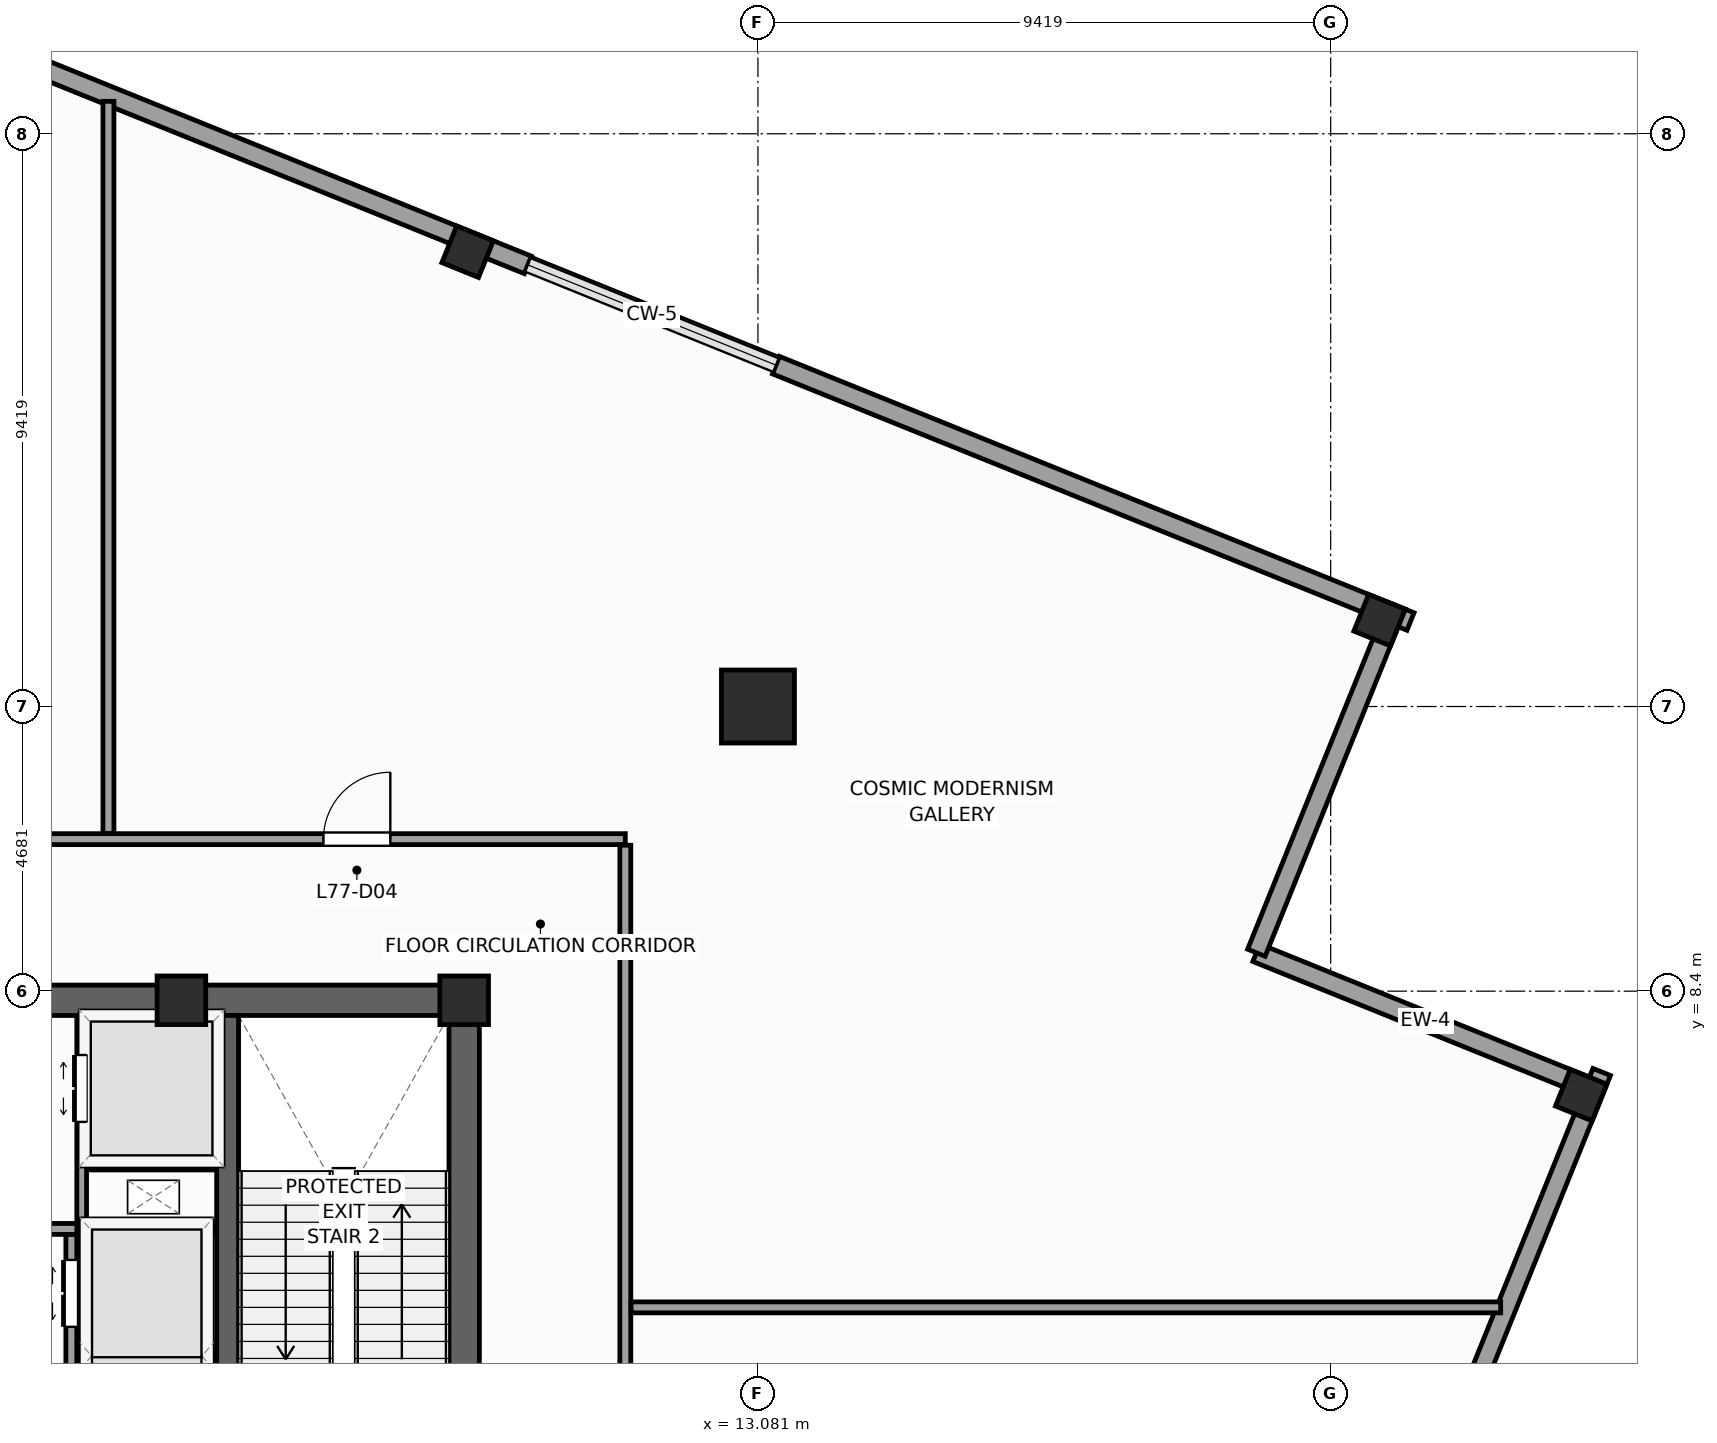
"""IFC4 building model, lengths in metres.
Left out: names, types, materials, properties, quantities, classifications, styles, units other than length and angle.
Written with IfcOpenShell. Run it as: python <this file> out.ifc"""

import sys

from ifc_helpers import new_model, si_unit, direction, frame, frame_2d, origin, origin_2d, place, context, subcontext, project, spatial, rectangle, extrude, source, transform, mapped, element, fill, save


model = new_model("IFC4")
c1 = context("Model", 3, precision=1e-05, world=origin(), true_north=direction((0.0, 1.0)))
c2 = subcontext(c1, "Body", "Model", "MODEL_VIEW")
j1 = project(units=[si_unit("LENGTHUNIT", "METRE"), si_unit("PLANEANGLEUNIT", "RADIAN")], contexts=[c1])
p1 = place(None, origin())
s1 = spatial("IfcSite", under=j1, at=p1, CompositionType="ELEMENT")
p2 = place(p1, origin())
s2 = spatial("IfcBuilding", under=s1, at=p2, CompositionType="ELEMENT")
p3 = place(p2, frame((0.0, 0.0, 312.0)))
s3 = spatial("IfcBuildingStorey", under=s2, at=p3, CompositionType="ELEMENT", Elevation=312.0)
p4 = place(p3, frame((-8.5, 8.25, 0.0), z_axis=(0.0, 0.0, 1.0), x_axis=(1.0, 0.0, 0.0)))
e1 = element("IfcWall", 1, at=p4, inside=s3, PredefinedType="SHEAR", context=c2, shape_type="SweptSolid", body=[
    extrude(rectangle(XDim=17.0, YDim=0.5, at=frame_2d((8.5, 0.0))), origin(), (0.0, 0.0, 1.0), 4.8),
])
p5 = place(p4, frame((7.85, 0.0, 0.0)))
e2 = element("IfcOpeningElement", 2, at=p5, cuts=e1, PredefinedType="OPENING", context=c2, shape_type="SweptSolid", body=[
    extrude(rectangle(XDim=1.3, YDim=2.2, at=frame_2d((0.65, 1.1))), frame((0.0, 0.26, 0.0), z_axis=(0.0, -1.0, 0.0), x_axis=(1.0, 0.0, 0.0)), (0.0, 0.0, 1.0), 0.52),
])
p6 = place(p3, frame((8.25, -8.0, 0.0), z_axis=(0.0, 0.0, 1.0), x_axis=(0.0, 1.0, 0.0)))
e3 = element("IfcWall", 3, at=p6, inside=s3, PredefinedType="SHEAR", context=c2, shape_type="SweptSolid", body=[
    extrude(rectangle(XDim=16.0, YDim=0.5, at=frame_2d((8.0, 0.0))), origin(), (0.0, 0.0, 1.0), 4.8),
])
p7 = place(p6, frame((4.69, 0.0, 0.0)))
e4 = element("IfcOpeningElement", 4, at=p7, cuts=e3, PredefinedType="OPENING", context=c2, shape_type="SweptSolid", body=[
    extrude(rectangle(XDim=1.3, YDim=2.2, at=frame_2d((0.65, 1.1))), frame((0.0, 0.26, 0.0), z_axis=(0.0, -1.0, 0.0), x_axis=(1.0, 0.0, 0.0)), (0.0, 0.0, 1.0), 0.52),
])
p8 = place(p3, frame((4.36, -8.0, 0.0), z_axis=(0.0, 0.0, 1.0), x_axis=(0.0, 1.0, 0.0)))
e5 = element("IfcWall", 5, at=p8, inside=s3, PredefinedType="SHEAR", context=c2, shape_type="SweptSolid", body=[
    extrude(rectangle(XDim=16.0, YDim=0.36, at=frame_2d((8.0, 0.0))), origin(), (0.0, 0.0, 1.0), 4.8),
])
m1 = source(origin(), c2, "Body", "SweptSolid", [
    extrude(rectangle(XDim=0.8, YDim=0.8, at=origin_2d()), origin(), (0.0, 0.0, 1.0), 4.8),
])
for number, where, z_axis, x_axis in (
    (6, (8.25, 8.25, 0.0), (0.0, 0.0, 1.0), (1.0, 0.0, 0.0)),
    (7, (3.6, 8.25, 0.0), (0.0, 0.0, 1.0), (1.0, 0.0, 0.0)),
):
    element("IfcColumn", number, at=place(p3, frame(where, z_axis=z_axis, x_axis=x_axis)), inside=s3, PredefinedType="PILASTER", context=c2, shape_type="MappedRepresentation", body=[
        mapped(m1, transform((0.0, 0.0, 0.0), scale=1.0)),
    ])
m2 = source(origin(), c2, "Body", "SweptSolid", [
    extrude(rectangle(XDim=1.2, YDim=1.2, at=origin_2d()), origin(), (0.0, 0.0, 1.0), 4.8),
])
p9 = place(p3, frame((13.081, 13.081, 0.0), z_axis=(0.0, 0.0, 1.0), x_axis=(1.0, 0.0, 0.0)))
e8 = element("IfcColumn", 8, at=p9, inside=s3, PredefinedType="COLUMN", context=c2, shape_type="MappedRepresentation", body=[
    mapped(m2, transform((0.0, 0.0, 0.0), scale=1.0)),
])
m3 = source(origin(), c2, "Body", "SweptSolid", [
    extrude(rectangle(XDim=0.65, YDim=0.65, at=origin_2d()), origin(), (0.0, 0.0, 1.0), 4.8),
])
for number, where, z_axis, x_axis in (
    (9, (26.62, 6.69, 0.0), (0.0, 0.0, 1.0), (0.375, 0.927, 0.0)),
    (10, (23.304, 14.501, 0.0), (0.0, 0.0, 1.0), (0.375, 0.927, 0.0)),
    (11, (8.307, 20.56, 0.0), (0.0, 0.0, 1.0), (0.375, 0.927, 0.0)),
):
    element("IfcColumn", number, at=place(p3, frame(where, z_axis=z_axis, x_axis=x_axis)), inside=s3, PredefinedType="COLUMN", context=c2, shape_type="MappedRepresentation", body=[
        mapped(m3, transform((0.0, 0.0, 0.0), scale=1.0)),
    ])
p10 = place(p3, frame((26.841, 6.784, 0.0), z_axis=(0.0, 0.0, 1.0), x_axis=(-0.927171722085, 0.374636620962, 0.0)))
e12 = element("IfcWall", 12, at=p10, inside=s3, PredefinedType="STANDARD", context=c2, shape_type="SweptSolid", body=[
    extrude(rectangle(XDim=6.0, YDim=0.31, at=frame_2d((3.0, 0.0))), origin(), (0.0, 0.0, 1.0), 3.85),
])
p11 = place(p3, frame((21.278, 9.032, 0.0), z_axis=(0.0, 0.0, 1.0), x_axis=(0.374602739196, 0.927185411764, 0.0)))
e13 = element("IfcWall", 13, at=p11, inside=s3, PredefinedType="STANDARD", context=c2, shape_type="SweptSolid", body=[
    extrude(rectangle(XDim=6.155, YDim=0.31, at=frame_2d((3.078, 0.0))), origin(), (0.0, 0.0, 1.0), 4.55),
])
p12 = place(p3, frame((20.718, -8.371, 0.0), z_axis=(0.0, 0.0, 1.0), x_axis=(0.374600710538, 0.927186231382, 0.0)))
e14 = element("IfcWall", 14, at=p12, inside=s3, PredefinedType="STANDARD", context=c2, shape_type="SweptSolid", body=[
    extrude(rectangle(XDim=16.655, YDim=0.31, at=frame_2d((8.328, 0.0))), origin(), (0.0, 0.0, 1.0), 3.95),
])
p13 = place(p12, frame((6.195, 0.0, 0.65)))
e15 = element("IfcOpeningElement", 15, at=p13, cuts=e14, PredefinedType="OPENING", context=c2, shape_type="SweptSolid", body=[
    extrude(rectangle(XDim=2.6, YDim=3.0, at=frame_2d((1.3, 1.5))), frame((0.0, 0.165, 0.0), z_axis=(0.0, -1.0, 0.0), x_axis=(1.0, 0.0, 0.0)), (0.0, 0.0, 1.0), 0.33),
])
p14 = place(p3, frame((23.813, 14.479, 0.0), z_axis=(0.0, 0.0, 1.0), x_axis=(-0.927178527544, 0.374619777991, 0.0)))
e16 = element("IfcWall", 16, at=p14, inside=s3, PredefinedType="STANDARD", context=c2, shape_type="SweptSolid", body=[
    extrude(rectangle(XDim=11.255, YDim=0.31, at=frame_2d((5.627, 0.0))), origin(), (0.0, 0.0, 1.0), 3.95),
])
p15 = place(p3, frame((9.298, 20.343, 0.0), z_axis=(0.0, 0.0, 1.0), x_axis=(-0.927183654967, 0.374607087443, 0.0)))
e17 = element("IfcWall", 17, at=p15, inside=s3, PredefinedType="STANDARD", context=c2, shape_type="SweptSolid", body=[
    extrude(rectangle(XDim=17.655, YDim=0.31, at=frame_2d((8.828, 0.0))), origin(), (0.0, 0.0, 1.0), 3.95),
])
p16 = place(p15, frame((9.646, 0.0, 0.65)))
e18 = element("IfcOpeningElement", 18, at=p16, cuts=e17, PredefinedType="OPENING", context=c2, shape_type="SweptSolid", body=[
    extrude(rectangle(XDim=2.6, YDim=3.0, at=frame_2d((1.3, 1.5))), frame((0.0, 0.165, 0.0), z_axis=(0.0, -1.0, 0.0), x_axis=(1.0, 0.0, 0.0)), (0.0, 0.0, 1.0), 0.33),
])
p17 = place(p3, frame((1.79, -7.98, 0.0), z_axis=(0.0, 0.0, 1.0), x_axis=(0.0, 1.0, 0.0)))
e19 = element("IfcWall", 19, at=p17, inside=s3, PredefinedType="PARTITIONING", context=c2, shape_type="SweptSolid", body=[
    extrude(rectangle(XDim=12.38, YDim=0.18, at=frame_2d((6.19, 0.0))), origin(), (0.0, 0.0, 1.0), 4.55),
])
p18 = place(p17, frame((8.8, 0.0, 0.0)))
e20 = element("IfcOpeningElement", 20, at=p18, cuts=e19, PredefinedType="OPENING", context=c2, shape_type="SweptSolid", body=[
    extrude(rectangle(XDim=1.1, YDim=2.2, at=frame_2d((0.55, 1.1))), frame((0.0, 0.1, 0.0), z_axis=(0.0, -1.0, 0.0), x_axis=(1.0, 0.0, 0.0)), (0.0, 0.0, 1.0), 0.2),
])
p19 = place(p17, frame((10.86, 0.0, 0.0)))
e21 = element("IfcOpeningElement", 21, at=p19, cuts=e19, PredefinedType="OPENING", context=c2, shape_type="SweptSolid", body=[
    extrude(rectangle(XDim=1.1, YDim=2.2, at=frame_2d((0.55, 1.1))), frame((0.0, 0.1, 0.0), z_axis=(0.0, -1.0, 0.0), x_axis=(1.0, 0.0, 0.0)), (0.0, 0.0, 1.0), 0.2),
])
p20 = place(p17, frame((1.4, 0.0, 0.0)))
e22 = element("IfcOpeningElement", 22, at=p20, cuts=e19, PredefinedType="OPENING", context=c2, shape_type="SweptSolid", body=[
    extrude(rectangle(XDim=1.15, YDim=2.25, at=frame_2d((0.575, 1.125))), frame((0.0, 0.1, 0.0), z_axis=(0.0, -1.0, 0.0), x_axis=(1.0, 0.0, 0.0)), (0.0, 0.0, 1.0), 0.2),
])
p21 = place(p17, frame((5.6, 0.0, 0.0)))
e23 = element("IfcOpeningElement", 23, at=p21, cuts=e19, PredefinedType="OPENING", context=c2, shape_type="SweptSolid", body=[
    extrude(rectangle(XDim=1.15, YDim=2.25, at=frame_2d((0.575, 1.125))), frame((0.0, 0.1, 0.0), z_axis=(0.0, -1.0, 0.0), x_axis=(1.0, 0.0, 0.0)), (0.0, 0.0, 1.0), 0.2),
])
p22 = place(p3, frame((-1.88, 4.49, 0.0), z_axis=(0.0, 0.0, 1.0), x_axis=(1.0, 0.0, 0.0)))
e24 = element("IfcWall", 24, at=p22, inside=s3, PredefinedType="PARTITIONING", context=c2, shape_type="SweptSolid", body=[
    extrude(rectangle(XDim=3.76, YDim=0.18, at=frame_2d((1.88, 0.0))), origin(), (0.0, 0.0, 1.0), 4.55),
])
p23 = place(p22, frame((1.23, 0.0, 0.0)))
e25 = element("IfcOpeningElement", 25, at=p23, cuts=e24, PredefinedType="OPENING", context=c2, shape_type="SweptSolid", body=[
    extrude(rectangle(XDim=1.3, YDim=2.2, at=frame_2d((0.65, 1.1))), frame((0.0, 0.1, 0.0), z_axis=(0.0, -1.0, 0.0), x_axis=(1.0, 0.0, 0.0)), (0.0, 0.0, 1.0), 0.2),
])
p24 = place(p3, frame((1.89, 4.49, 0.0), z_axis=(0.0, 0.0, 1.0), x_axis=(1.0, 0.0, 0.0)))
e26 = element("IfcWall", 26, at=p24, inside=s3, PredefinedType="PARTITIONING", context=c2, shape_type="SweptSolid", body=[
    extrude(rectangle(XDim=2.28, YDim=0.18, at=frame_2d((1.14, 0.0))), origin(), (0.0, 0.0, 1.0), 4.55),
])
p25 = place(p3, frame((1.9, 2.4, 0.0), z_axis=(0.0, 0.0, 1.0), x_axis=(1.0, 0.0, 0.0)))
e27 = element("IfcWall", 27, at=p25, inside=s3, PredefinedType="PARTITIONING", context=c2, shape_type="SweptSolid", body=[
    extrude(rectangle(XDim=2.26, YDim=0.12, at=frame_2d((1.13, 0.0))), origin(), (0.0, 0.0, 1.0), 4.55),
])
p26 = place(p3, frame((1.96, 4.58, 0.0), z_axis=(0.0, 0.0, 1.0), x_axis=(0.0, 1.0, 0.0)))
e28 = element("IfcWall", 28, at=p26, inside=s3, PredefinedType="PARTITIONING", context=c2, shape_type="SweptSolid", body=[
    extrude(rectangle(XDim=3.4, YDim=0.16, at=frame_2d((1.7, 0.0))), origin(), (0.0, 0.0, 1.0), 4.55),
])
p27 = place(p26, frame((1.67, 0.0, 0.0)))
e29 = element("IfcOpeningElement", 29, at=p27, cuts=e28, PredefinedType="OPENING", context=c2, shape_type="SweptSolid", body=[
    extrude(rectangle(XDim=1.1, YDim=2.2, at=frame_2d((0.55, 1.1))), frame((0.0, 0.09, 0.0), z_axis=(0.0, -1.0, 0.0), x_axis=(1.0, 0.0, 0.0)), (0.0, 0.0, 1.0), 0.18),
])
p28 = place(p3, frame((2.06, 5.52, 0.0), z_axis=(0.0, 0.0, 1.0), x_axis=(1.0, 0.0, 0.0)))
e30 = element("IfcWall", 30, at=p28, inside=s3, PredefinedType="PARTITIONING", context=c2, shape_type="SweptSolid", body=[
    extrude(rectangle(XDim=2.1, YDim=0.12, at=frame_2d((1.05, 0.0))), origin(), (0.0, 0.0, 1.0), 4.55),
])
p29 = place(p3, frame((-10.3, 10.9, 0.0), z_axis=(0.0, 0.0, 1.0), x_axis=(1.0, 0.0, 0.0)))
e31 = element("IfcWall", 31, at=p29, inside=s3, PredefinedType="PARTITIONING", context=c2, shape_type="SweptSolid", body=[
    extrude(rectangle(XDim=21.2, YDim=0.18, at=frame_2d((10.6, 0.0))), origin(), (0.0, 0.0, 1.0), 4.55),
])
p30 = place(p29, frame((1.605, 0.0, 0.0)))
e32 = element("IfcOpeningElement", 32, at=p30, cuts=e31, PredefinedType="OPENING", context=c2, shape_type="SweptSolid", body=[
    extrude(rectangle(XDim=0.95, YDim=2.1, at=frame_2d((0.475, 1.05))), frame((0.0, 0.1, 0.0), z_axis=(0.0, -1.0, 0.0), x_axis=(1.0, 0.0, 0.0)), (0.0, 0.0, 1.0), 0.2),
])
p31 = place(p29, frame((7.409, 0.0, 0.0)))
e33 = element("IfcOpeningElement", 33, at=p31, cuts=e31, PredefinedType="OPENING", context=c2, shape_type="SweptSolid", body=[
    extrude(rectangle(XDim=1.1, YDim=2.2, at=frame_2d((0.55, 1.1))), frame((0.0, 0.1, 0.0), z_axis=(0.0, -1.0, 0.0), x_axis=(1.0, 0.0, 0.0)), (0.0, 0.0, 1.0), 0.2),
])
p32 = place(p29, frame((16.236, 0.0, 0.0)))
e34 = element("IfcOpeningElement", 34, at=p32, cuts=e31, PredefinedType="OPENING", context=c2, shape_type="SweptSolid", body=[
    extrude(rectangle(XDim=1.1, YDim=2.2, at=frame_2d((0.55, 1.1))), frame((0.0, 0.1, 0.0), z_axis=(0.0, -1.0, 0.0), x_axis=(1.0, 0.0, 0.0)), (0.0, 0.0, 1.0), 0.2),
])
p33 = place(p3, frame((10.9, -10.2, 0.0), z_axis=(0.0, 0.0, 1.0), x_axis=(0.0, 1.0, 0.0)))
e35 = element("IfcWall", 35, at=p33, inside=s3, PredefinedType="PARTITIONING", context=c2, shape_type="SweptSolid", body=[
    extrude(rectangle(XDim=21.0, YDim=0.18, at=frame_2d((10.5, 0.0))), origin(), (0.0, 0.0, 1.0), 4.55),
])
p34 = place(p33, frame((9.65, 0.0, 0.0)))
e36 = element("IfcOpeningElement", 36, at=p34, cuts=e35, PredefinedType="OPENING", context=c2, shape_type="SweptSolid", body=[
    extrude(rectangle(XDim=1.1, YDim=2.2, at=frame_2d((0.55, 1.1))), frame((0.0, 0.1, 0.0), z_axis=(0.0, -1.0, 0.0), x_axis=(1.0, 0.0, 0.0)), (0.0, 0.0, 1.0), 0.2),
])
p35 = place(p3, frame((2.4, 10.995, 0.0), z_axis=(0.0, 0.0, 1.0), x_axis=(0.0, 1.0, 0.0)))
e37 = element("IfcWall", 37, at=p35, inside=s3, PredefinedType="PARTITIONING", context=c2, shape_type="SweptSolid", body=[
    extrude(rectangle(XDim=12.038, YDim=0.18, at=frame_2d((6.019, 0.0))), origin(), (0.0, 0.0, 1.0), 4.22),
])
p36 = place(p3, frame((10.995, 3.2, 0.0), z_axis=(0.0, 0.0, 1.0), x_axis=(1.0, 0.0, 0.0)))
e38 = element("IfcWall", 38, at=p36, inside=s3, PredefinedType="PARTITIONING", context=c2, shape_type="SweptSolid", body=[
    extrude(rectangle(XDim=14.301, YDim=0.18, at=frame_2d((7.15, 0.0))), origin(), (0.0, 0.0, 1.0), 4.55),
])
m4 = source(origin(), c2, "Body", "SweptSolid", [
    extrude(rectangle(XDim=1.1, YDim=2.2, at=frame_2d((0.55, 1.1))), frame((0.0, 0.025, 0.0), z_axis=(0.0, -1.0, 0.0), x_axis=(1.0, 0.0, 0.0)), (0.0, 0.0, 1.0), 0.05),
])
p37 = place(p19, origin())
e39 = element("IfcDoor", 39, at=p37, inside=s3, OperationType="DOUBLE_DOOR_SLIDING", PredefinedType="DOOR", context=c2, shape_type="MappedRepresentation", body=[
    mapped(m4, transform((0.0, 0.0, 0.0), scale=1.0)),
])
fill(e21, e39)
p38 = place(p27, origin())
e40 = element("IfcDoor", 40, at=p38, inside=s3, OperationType="DOUBLE_DOOR_SLIDING", PredefinedType="DOOR", context=c2, shape_type="MappedRepresentation", body=[
    mapped(m4, transform((0.0, 0.0, 0.0), scale=1.0)),
])
fill(e29, e40)
p39 = place(p32, origin())
e41 = element("IfcDoor", 41, at=p39, inside=s3, OperationType="SINGLE_SWING_RIGHT", PredefinedType="DOOR", context=c2, shape_type="MappedRepresentation", body=[
    mapped(m4, transform((0.0, 0.0, 0.0), scale=1.0)),
])
fill(e34, e41)
save(model, sys.argv[1])
